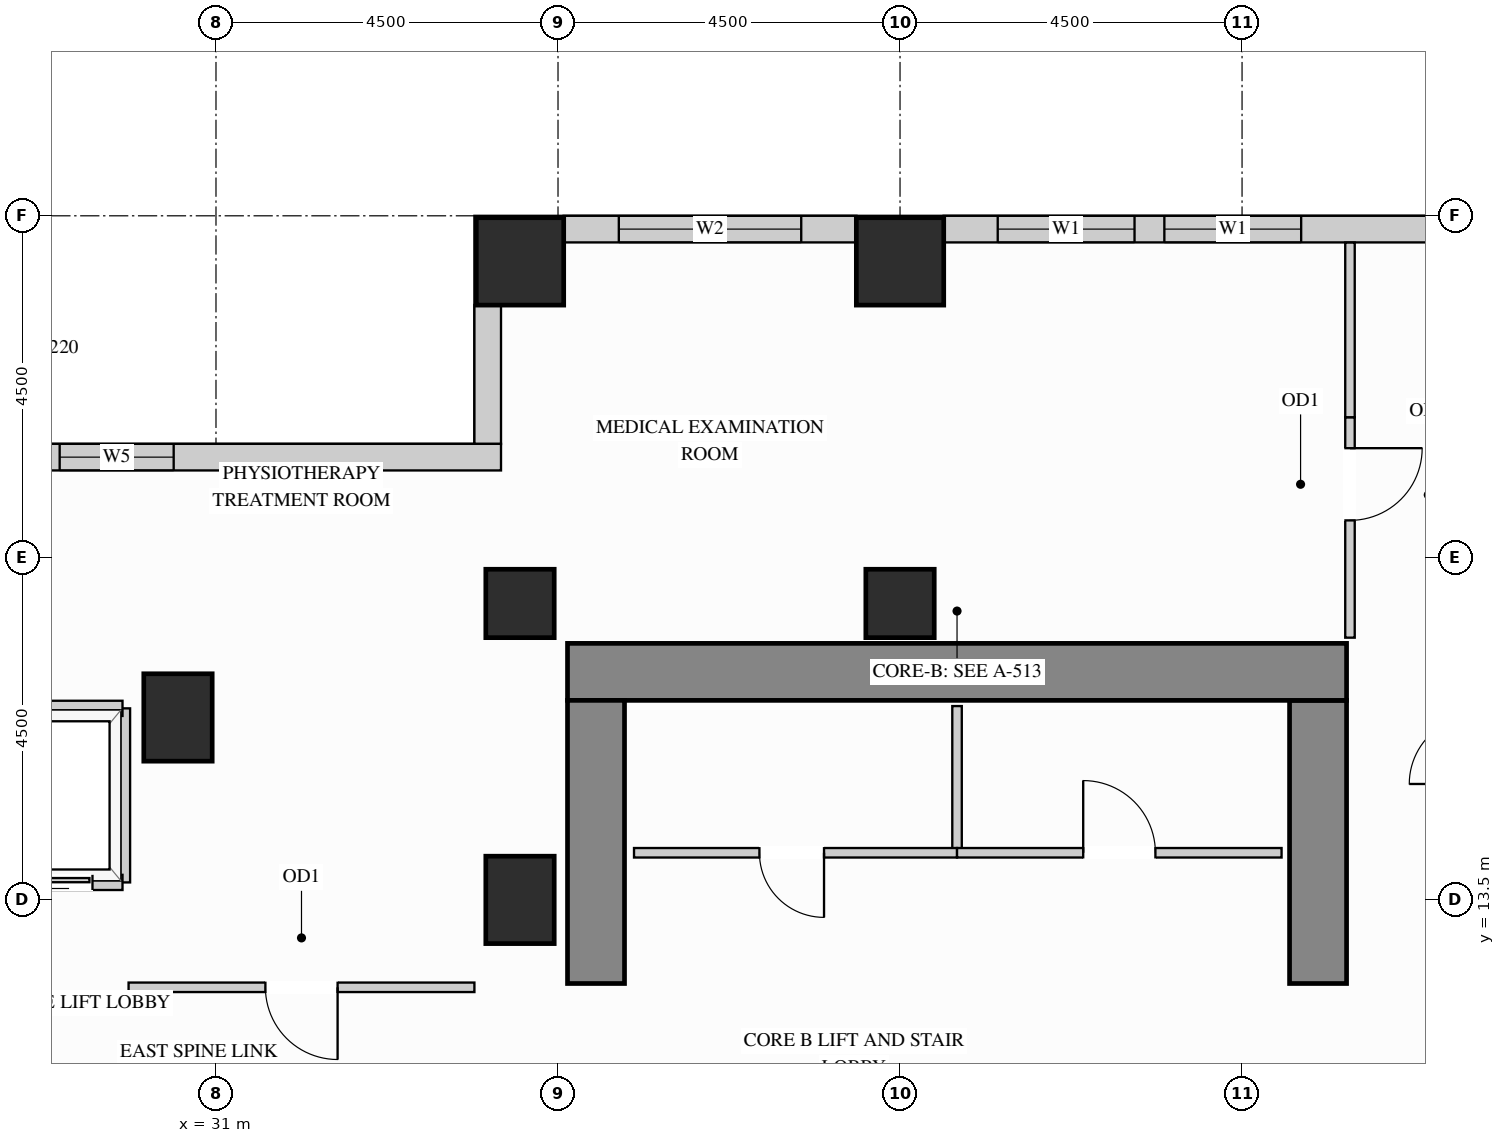
"""IFC4 building model, lengths in metres.
Left out: names, types, materials, properties, quantities, classifications, styles, units other than length and angle.
Written with IfcOpenShell. Run it as: python <this file> out.ifc"""

import sys

from ifc_helpers import new_model, si_unit, direction, frame, frame_2d, origin, origin_2d, place, context, subcontext, project, spatial, rectangle, extrude, source, transform, mapped, element, fill, save


model = new_model("IFC4")
c1 = context("Model", 3, precision=1e-05, world=origin(), true_north=direction((0.0, 1.0)))
c2 = subcontext(c1, "Body", "Model", "MODEL_VIEW")
j1 = project(units=[si_unit("LENGTHUNIT", "METRE"), si_unit("PLANEANGLEUNIT", "RADIAN")], contexts=[c1])
p1 = place(None, origin())
s1 = spatial("IfcSite", under=j1, at=p1, CompositionType="ELEMENT")
p2 = place(p1, origin())
s2 = spatial("IfcBuilding", under=s1, at=p2, CompositionType="ELEMENT")
p3 = place(p2, frame((0.0, 0.0, 117.0)))
s3 = spatial("IfcBuildingStorey", under=s2, at=p3, CompositionType="ELEMENT", Elevation=117.0)
m1 = source(origin(), c2, "Body", "SweptSolid", [
    extrude(rectangle(XDim=0.9, YDim=0.9, at=origin_2d()), origin(), (0.0, 0.0, 1.0), 3.38),
])
for number, where, z_axis, x_axis in (
    (1, (35.0, 17.4, 0.0), (0.0, 0.0, 1.0), (1.0, 0.0, 0.0)),
    (2, (40.0, 17.4, 0.0), (0.0, 0.0, 1.0), (1.0, 0.0, 0.0)),
):
    element("IfcColumn", number, at=place(p3, frame(where, z_axis=z_axis, x_axis=x_axis)), inside=s3, PredefinedType="COLUMN", context=c2, shape_type="MappedRepresentation", body=[
        mapped(m1, transform((0.0, 0.0, 0.0), x_axis=(1.0, 0.0, 0.0), y_axis=(0.0, 1.0, 0.0), z_axis=(0.0, 0.0, 1.0))),
    ])
m2 = source(origin(), c2, "Body", "SweptSolid", [
    extrude(rectangle(XDim=0.9, YDim=1.15, at=origin_2d()), origin(), (0.0, 0.0, 1.0), 3.38),
])
for number, where, z_axis, x_axis in (
    (3, (35.0, 13.5, 0.0), (0.0, 0.0, 1.0), (1.0, 0.0, 0.0)),
    (4, (30.5, 15.9, 0.0), (0.0, 0.0, 1.0), (1.0, 0.0, 0.0)),
):
    element("IfcColumn", number, at=place(p3, frame(where, z_axis=z_axis, x_axis=x_axis)), inside=s3, PredefinedType="COLUMN", context=c2, shape_type="MappedRepresentation", body=[
        mapped(m2, transform((0.0, 0.0, 0.0), x_axis=(1.0, 0.0, 0.0), y_axis=(0.0, 1.0, 0.0), z_axis=(0.0, 0.0, 1.0))),
    ])
m3 = source(origin(), c2, "Body", "SweptSolid", [
    extrude(rectangle(XDim=1.15, YDim=1.15, at=origin_2d()), origin(), (0.0, 0.0, 1.0), 3.38),
])
for number, where, z_axis, x_axis in (
    (5, (35.0, 21.9, 0.0), (0.0, 0.0, 1.0), (1.0, 0.0, 0.0)),
    (6, (40.0, 21.9, 0.0), (0.0, 0.0, 1.0), (1.0, 0.0, 0.0)),
):
    element("IfcColumn", number, at=place(p3, frame(where, z_axis=z_axis, x_axis=x_axis)), inside=s3, PredefinedType="COLUMN", context=c2, shape_type="MappedRepresentation", body=[
        mapped(m3, transform((0.0, 0.0, 0.0), x_axis=(1.0, 0.0, 0.0), y_axis=(0.0, 1.0, 0.0), z_axis=(0.0, 0.0, 1.0))),
    ])
m4 = source(origin(), c2, "Body", "SweptSolid", [
    extrude(rectangle(XDim=3.725, YDim=0.75, at=frame_2d((1.863, 0.0))), origin(), (0.0, 0.0, 1.0), 3.38),
])
p4 = place(p3, frame((45.5, 12.4, 0.0), z_axis=(0.0, 0.0, 1.0), x_axis=(0.0, 1.0, 0.0)))
e7 = element("IfcWall", 7, at=p4, inside=s3, PredefinedType="SHEAR", context=c2, shape_type="MappedRepresentation", body=[
    mapped(m4, transform((0.0, 0.0, 0.0), x_axis=(1.0, 0.0, 0.0), y_axis=(0.0, 1.0, 0.0), z_axis=(0.0, 0.0, 1.0))),
])
m5 = source(origin(), c2, "Body", "SweptSolid", [
    extrude(rectangle(XDim=10.25, YDim=0.75, at=frame_2d((5.125, 0.0))), origin(), (0.0, 0.0, 1.0), 3.38),
])
p5 = place(p3, frame((35.625, 16.5, 0.0), z_axis=(0.0, 0.0, 1.0), x_axis=(1.0, 0.0, 0.0)))
e8 = element("IfcWall", 8, at=p5, inside=s3, PredefinedType="SHEAR", context=c2, shape_type="MappedRepresentation", body=[
    mapped(m5, transform((0.0, 0.0, 0.0), x_axis=(1.0, 0.0, 0.0), y_axis=(0.0, 1.0, 0.0), z_axis=(0.0, 0.0, 1.0))),
])
p6 = place(p3, frame((36.0, 12.4, 0.0), z_axis=(0.0, 0.0, 1.0), x_axis=(0.0, 1.0, 0.0)))
e9 = element("IfcWall", 9, at=p6, inside=s3, PredefinedType="SHEAR", context=c2, shape_type="MappedRepresentation", body=[
    mapped(m4, transform((0.0, 0.0, 0.0), x_axis=(1.0, 0.0, 0.0), y_axis=(0.0, 1.0, 0.0), z_axis=(0.0, 0.0, 1.0))),
])
p7 = place(p3, frame((47.027, 22.325, 0.0), z_axis=(0.0, 0.0, 1.0), x_axis=(-1.0, 0.0, 0.0)))
e10 = element("IfcWall", 10, at=p7, inside=s3, PredefinedType="SOLIDWALL", context=c2, shape_type="SweptSolid", body=[
    extrude(rectangle(XDim=6.454, YDim=0.35, at=frame_2d((3.227, 0.0))), origin(), (0.0, 0.0, 1.0), 3.365),
])
p8 = place(p7, frame((1.749, 0.0, 0.78)))
e11 = element("IfcOpeningElement", 11, at=p8, cuts=e10, PredefinedType="OPENING", context=c2, shape_type="SweptSolid", body=[
    extrude(rectangle(XDim=1.8, YDim=2.1, at=frame_2d((0.9, 1.05))), frame((0.0, 0.185, 0.0), z_axis=(0.0, -1.0, 0.0), x_axis=(1.0, 0.0, 0.0)), (0.0, 0.0, 1.0), 0.37),
])
p9 = place(p7, frame((3.942, 0.0, 0.78)))
e12 = element("IfcOpeningElement", 12, at=p9, cuts=e10, PredefinedType="OPENING", context=c2, shape_type="SweptSolid", body=[
    extrude(rectangle(XDim=1.8, YDim=2.1, at=frame_2d((0.9, 1.05))), frame((0.0, 0.185, 0.0), z_axis=(0.0, -1.0, 0.0), x_axis=(1.0, 0.0, 0.0)), (0.0, 0.0, 1.0), 0.37),
])
p10 = place(p3, frame((39.427, 22.325, 0.0), z_axis=(0.0, 0.0, 1.0), x_axis=(-1.0, 0.0, 0.0)))
e13 = element("IfcWall", 13, at=p10, inside=s3, PredefinedType="SOLIDWALL", context=c2, shape_type="SweptSolid", body=[
    extrude(rectangle(XDim=3.854, YDim=0.35, at=frame_2d((1.927, 0.0))), origin(), (0.0, 0.0, 1.0), 3.365),
])
p11 = place(p10, frame((0.727, 0.0, 0.78)))
e14 = element("IfcOpeningElement", 14, at=p11, cuts=e13, PredefinedType="OPENING", context=c2, shape_type="SweptSolid", body=[
    extrude(rectangle(XDim=2.4, YDim=2.1, at=frame_2d((1.2, 1.05))), frame((0.0, 0.185, 0.0), z_axis=(0.0, -1.0, 0.0), x_axis=(1.0, 0.0, 0.0)), (0.0, 0.0, 1.0), 0.37),
])
m6 = source(origin(), c2, "Body", "SweptSolid", [
    extrude(rectangle(XDim=1.829, YDim=0.35, at=frame_2d((0.915, 0.0))), origin(), (0.0, 0.0, 1.0), 3.365),
])
p12 = place(p3, frame((34.575, 21.327, 0.0), z_axis=(0.0, 0.0, 1.0), x_axis=(0.0, -1.0, 0.0)))
e15 = element("IfcWall", 15, at=p12, inside=s3, PredefinedType="SOLIDWALL", context=c2, shape_type="MappedRepresentation", body=[
    mapped(m6, transform((0.0, 0.0, 0.0), x_axis=(1.0, 0.0, 0.0), y_axis=(0.0, 1.0, 0.0), z_axis=(0.0, 0.0, 1.0))),
])
p13 = place(p3, frame((34.75, 19.325, 0.0), z_axis=(0.0, 0.0, 1.0), x_axis=(-1.0, 0.0, 0.0)))
e16 = element("IfcWall", 16, at=p13, inside=s3, PredefinedType="SOLIDWALL", context=c2, shape_type="SweptSolid", body=[
    extrude(rectangle(XDim=15.6, YDim=0.35, at=frame_2d((7.8, 0.0))), origin(), (0.0, 0.0, 1.0), 3.365),
])
p14 = place(p13, frame((4.307, 0.0, 0.78)))
e17 = element("IfcOpeningElement", 17, at=p14, cuts=e16, PredefinedType="OPENING", context=c2, shape_type="SweptSolid", body=[
    extrude(rectangle(XDim=1.5, YDim=2.0, at=frame_2d((0.75, 1.0))), frame((0.0, 0.185, 0.0), z_axis=(0.0, -1.0, 0.0), x_axis=(1.0, 0.0, 0.0)), (0.0, 0.0, 1.0), 0.37),
])
p15 = place(p13, frame((9.793, 0.0, 0.78)))
e18 = element("IfcOpeningElement", 18, at=p15, cuts=e16, PredefinedType="OPENING", context=c2, shape_type="SweptSolid", body=[
    extrude(rectangle(XDim=1.5, YDim=2.0, at=frame_2d((0.75, 1.0))), frame((0.0, 0.185, 0.0), z_axis=(0.0, -1.0, 0.0), x_axis=(1.0, 0.0, 0.0)), (0.0, 0.0, 1.0), 0.37),
])
m7 = source(origin(), c2, "Body", "SweptSolid", [
    extrude(rectangle(XDim=1.93, YDim=0.125, at=frame_2d((0.965, 0.0))), origin(), (0.0, 0.0, 1.0), 3.365),
])
p16 = place(p3, frame((40.75, 14.12, 0.0), z_axis=(0.0, 0.0, 1.0), x_axis=(0.0, 1.0, 0.0)))
e19 = element("IfcWall", 19, at=p16, inside=s3, PredefinedType="PARTITIONING", context=c2, shape_type="MappedRepresentation", body=[
    mapped(m7, transform((0.0, 0.0, 0.0), x_axis=(1.0, 0.0, 0.0), y_axis=(0.0, 1.0, 0.0), z_axis=(0.0, 0.0, 1.0))),
])
p17 = place(p3, frame((36.5, 14.12, 0.0), z_axis=(0.0, 0.0, 1.0), x_axis=(1.0, 0.0, 0.0)))
e20 = element("IfcWall", 20, at=p17, inside=s3, PredefinedType="PARTITIONING", context=c2, shape_type="SweptSolid", body=[
    extrude(rectangle(XDim=4.25, YDim=0.125, at=frame_2d((2.125, 0.0))), origin(), (0.0, 0.0, 1.0), 3.365),
])
p18 = place(p17, frame((1.65, 0.0, 0.0)))
e21 = element("IfcOpeningElement", 21, at=p18, cuts=e20, PredefinedType="OPENING", context=c2, shape_type="SweptSolid", body=[
    extrude(rectangle(XDim=0.85, YDim=2.1, at=frame_2d((0.425, 1.05))), frame((0.0, 0.073, 0.0), z_axis=(0.0, -1.0, 0.0), x_axis=(1.0, 0.0, 0.0)), (0.0, 0.0, 1.0), 0.145),
])
p19 = place(p3, frame((40.75, 14.12, 0.0), z_axis=(0.0, 0.0, 1.0), x_axis=(1.0, 0.0, 0.0)))
e22 = element("IfcWall", 22, at=p19, inside=s3, PredefinedType="PARTITIONING", context=c2, shape_type="SweptSolid", body=[
    extrude(rectangle(XDim=4.27, YDim=0.125, at=frame_2d((2.135, 0.0))), origin(), (0.0, 0.0, 1.0), 3.365),
])
p20 = place(p19, frame((1.66, 0.0, 0.0)))
e23 = element("IfcOpeningElement", 23, at=p20, cuts=e22, PredefinedType="OPENING", context=c2, shape_type="SweptSolid", body=[
    extrude(rectangle(XDim=0.95, YDim=2.15, at=frame_2d((0.475, 1.075))), frame((0.0, 0.073, 0.0), z_axis=(0.0, -1.0, 0.0), x_axis=(1.0, 0.0, 0.0)), (0.0, 0.0, 1.0), 0.145),
])
p21 = place(p3, frame((45.92, 16.95, 0.0), z_axis=(0.0, 0.0, 1.0), x_axis=(0.0, 1.0, 0.0)))
e24 = element("IfcWall", 24, at=p21, inside=s3, PredefinedType="PARTITIONING", context=c2, shape_type="SweptSolid", body=[
    extrude(rectangle(XDim=2.9, YDim=0.125, at=frame_2d((1.45, 0.0))), origin(), (0.0, 0.0, 1.0), 3.365),
])
p22 = place(p21, frame((1.543, 0.0, 0.0)))
e25 = element("IfcOpeningElement", 25, at=p22, cuts=e24, PredefinedType="OPENING", context=c2, shape_type="SweptSolid", body=[
    extrude(rectangle(XDim=0.95, YDim=2.15, at=frame_2d((0.475, 1.075))), frame((0.0, 0.073, 0.0), z_axis=(0.0, -1.0, 0.0), x_axis=(1.0, 0.0, 0.0)), (0.0, 0.0, 1.0), 0.145),
])
m8 = source(origin(), c2, "Body", "SweptSolid", [
    extrude(rectangle(XDim=2.298, YDim=0.125, at=frame_2d((1.149, 0.0))), origin(), (0.0, 0.0, 1.0), 3.365),
])
p23 = place(p3, frame((45.92, 19.85, 0.0), z_axis=(0.0, 0.0, 1.0), x_axis=(0.0, 1.0, 0.0)))
e26 = element("IfcWall", 26, at=p23, inside=s3, PredefinedType="PARTITIONING", context=c2, shape_type="MappedRepresentation", body=[
    mapped(m8, transform((0.0, 0.0, 0.0), x_axis=(1.0, 0.0, 0.0), y_axis=(0.0, 1.0, 0.0), z_axis=(0.0, 0.0, 1.0))),
])
p24 = place(p3, frame((29.85, 12.35, 0.0), z_axis=(0.0, 0.0, 1.0), x_axis=(1.0, 0.0, 0.0)))
e27 = element("IfcWall", 27, at=p24, inside=s3, PredefinedType="PARTITIONING", context=c2, shape_type="SweptSolid", body=[
    extrude(rectangle(XDim=4.55, YDim=0.125, at=frame_2d((2.275, 0.0))), origin(), (0.0, 0.0, 1.0), 3.365),
])
p25 = place(p24, frame((1.8, 0.0, 0.0)))
e28 = element("IfcOpeningElement", 28, at=p25, cuts=e27, PredefinedType="OPENING", context=c2, shape_type="SweptSolid", body=[
    extrude(rectangle(XDim=0.95, YDim=2.15, at=frame_2d((0.475, 1.075))), frame((0.0, 0.073, 0.0), z_axis=(0.0, -1.0, 0.0), x_axis=(1.0, 0.0, 0.0)), (0.0, 0.0, 1.0), 0.145),
])
m9 = source(origin(), c2, "Body", "SweptSolid", [
    extrude(rectangle(XDim=2.29, YDim=0.2, at=frame_2d((1.145, 0.0))), origin(), (0.0, 0.0, 1.0), 3.365),
])
p26 = place(p3, frame((29.77, 13.73, 0.0), z_axis=(0.0, 0.0, 1.0), x_axis=(0.0, 1.0, 0.0)))
e29 = element("IfcWall", 29, at=p26, inside=s3, PredefinedType="PARTITIONING", context=c2, shape_type="MappedRepresentation", body=[
    mapped(m9, transform((0.0, 0.0, 0.0), x_axis=(1.0, 0.0, 0.0), y_axis=(0.0, 1.0, 0.0), z_axis=(0.0, 0.0, 1.0))),
])
m10 = source(origin(), c2, "Body", "SweptSolid", [
    extrude(rectangle(XDim=1.89, YDim=0.2, at=frame_2d((0.945, 0.0))), origin(), (0.0, 0.0, 1.0), 2.677),
])
p27 = place(p3, frame((27.88, 16.02, 0.0), z_axis=(0.0, 0.0, 1.0), x_axis=(1.0, 0.0, 0.0)))
e30 = element("IfcWall", 30, at=p27, inside=s3, PredefinedType="PARTITIONING", context=c2, shape_type="MappedRepresentation", body=[
    mapped(m10, transform((0.0, 0.0, 0.0), x_axis=(1.0, 0.0, 0.0), y_axis=(0.0, 1.0, 0.0), z_axis=(0.0, 0.0, 1.0))),
])
p28 = place(p3, frame((27.88, 13.73, 0.0), z_axis=(0.0, 0.0, 1.0), x_axis=(1.0, 0.0, 0.0)))
e31 = element("IfcWall", 31, at=p28, inside=s3, PredefinedType="PARTITIONING", context=c2, shape_type="SweptSolid", body=[
    extrude(rectangle(XDim=1.89, YDim=0.2, at=frame_2d((0.945, 0.0))), origin(), (0.0, 0.0, 1.0), 2.446),
])
p29 = place(p28, frame((0.395, 0.0, 0.0)))
e32 = element("IfcOpeningElement", 32, at=p29, cuts=e31, PredefinedType="OPENING", context=c2, shape_type="SweptSolid", body=[
    extrude(rectangle(XDim=1.1, YDim=2.2, at=frame_2d((0.55, 1.1))), frame((0.0, 0.11, 0.0), z_axis=(0.0, -1.0, 0.0), x_axis=(1.0, 0.0, 0.0)), (0.0, 0.0, 1.0), 0.22),
])
m11 = source(origin(), c2, "Body", "SweptSolid", [
    extrude(rectangle(XDim=1.1, YDim=2.2, at=frame_2d((0.55, 1.1))), frame((0.0, 0.025, 0.0), z_axis=(0.0, -1.0, 0.0), x_axis=(1.0, 0.0, 0.0)), (0.0, 0.0, 1.0), 0.05),
])
p30 = place(p29, origin())
e33 = element("IfcDoor", 33, at=p30, inside=s3, OperationType="SLIDING_TO_LEFT", PredefinedType="DOOR", context=c2, shape_type="MappedRepresentation", body=[
    mapped(m11, transform((0.0, 0.0, 0.0), x_axis=(1.0, 0.0, 0.0), y_axis=(0.0, 1.0, 0.0), z_axis=(0.0, 0.0, 1.0))),
])
fill(e32, e33)
m12 = source(origin(), c2, "Body", "SweptSolid", [
    extrude(rectangle(XDim=0.95, YDim=2.15, at=frame_2d((0.475, 1.075))), frame((0.0, 0.025, 0.0), z_axis=(0.0, -1.0, 0.0), x_axis=(1.0, 0.0, 0.0)), (0.0, 0.0, 1.0), 0.05),
])
p31 = place(p20, origin())
e34 = element("IfcDoor", 34, at=p31, inside=s3, OperationType="SINGLE_SWING_LEFT", PredefinedType="DOOR", context=c2, shape_type="MappedRepresentation", body=[
    mapped(m12, transform((0.0, 0.0, 0.0), x_axis=(1.0, 0.0, 0.0), y_axis=(0.0, 1.0, 0.0), z_axis=(0.0, 0.0, 1.0))),
])
fill(e23, e34)
p32 = place(p22, origin())
e35 = element("IfcDoor", 35, at=p32, inside=s3, OperationType="SINGLE_SWING_RIGHT", PredefinedType="DOOR", context=c2, shape_type="MappedRepresentation", body=[
    mapped(m12, transform((0.0, 0.0, 0.0), x_axis=(1.0, 0.0, 0.0), y_axis=(0.0, 1.0, 0.0), z_axis=(0.0, 0.0, 1.0))),
])
fill(e25, e35)
p33 = place(p25, origin())
e36 = element("IfcDoor", 36, at=p33, inside=s3, OperationType="SINGLE_SWING_RIGHT", PredefinedType="DOOR", context=c2, shape_type="MappedRepresentation", body=[
    mapped(m12, transform((0.0, 0.0, 0.0), x_axis=(1.0, 0.0, 0.0), y_axis=(0.0, 1.0, 0.0), z_axis=(0.0, 0.0, 1.0))),
])
fill(e28, e36)
m13 = source(origin(), c2, "Body", "SweptSolid", [
    extrude(rectangle(XDim=0.85, YDim=2.1, at=frame_2d((0.425, 1.05))), frame((0.0, 0.025, 0.0), z_axis=(0.0, -1.0, 0.0), x_axis=(1.0, 0.0, 0.0)), (0.0, 0.0, 1.0), 0.05),
])
p34 = place(p18, origin())
e37 = element("IfcDoor", 37, at=p34, inside=s3, OperationType="SINGLE_SWING_RIGHT", PredefinedType="DOOR", context=c2, shape_type="MappedRepresentation", body=[
    mapped(m13, transform((0.0, 0.0, 0.0), x_axis=(1.0, 0.0, 0.0), y_axis=(0.0, 1.0, 0.0), z_axis=(0.0, 0.0, 1.0))),
])
fill(e21, e37)
m14 = source(origin(), c2, "Body", "SweptSolid", [
    extrude(rectangle(XDim=1.8, YDim=2.1, at=frame_2d((0.9, 1.05))), frame((0.0, 0.03, 0.0), z_axis=(0.0, -1.0, 0.0), x_axis=(1.0, 0.0, 0.0)), (0.0, 0.0, 1.0), 0.06),
])
p35 = place(p8, origin())
e38 = element("IfcWindow", 38, at=p35, inside=s3, PartitioningType="SINGLE_PANEL", PredefinedType="WINDOW", context=c2, shape_type="MappedRepresentation", body=[
    mapped(m14, transform((0.0, 0.0, 0.0), x_axis=(1.0, 0.0, 0.0), y_axis=(0.0, 1.0, 0.0), z_axis=(0.0, 0.0, 1.0))),
])
fill(e11, e38)
p36 = place(p9, origin())
e39 = element("IfcWindow", 39, at=p36, inside=s3, PartitioningType="SINGLE_PANEL", PredefinedType="WINDOW", context=c2, shape_type="MappedRepresentation", body=[
    mapped(m14, transform((0.0, 0.0, 0.0), x_axis=(1.0, 0.0, 0.0), y_axis=(0.0, 1.0, 0.0), z_axis=(0.0, 0.0, 1.0))),
])
fill(e12, e39)
m15 = source(origin(), c2, "Body", "SweptSolid", [
    extrude(rectangle(XDim=2.4, YDim=2.1, at=frame_2d((1.2, 1.05))), frame((0.0, 0.03, 0.0), z_axis=(0.0, -1.0, 0.0), x_axis=(1.0, 0.0, 0.0)), (0.0, 0.0, 1.0), 0.06),
])
p37 = place(p11, origin())
e40 = element("IfcWindow", 40, at=p37, inside=s3, PartitioningType="SINGLE_PANEL", PredefinedType="WINDOW", context=c2, shape_type="MappedRepresentation", body=[
    mapped(m15, transform((0.0, 0.0, 0.0), x_axis=(1.0, 0.0, 0.0), y_axis=(0.0, 1.0, 0.0), z_axis=(0.0, 0.0, 1.0))),
])
fill(e14, e40)
m16 = source(origin(), c2, "Body", "SweptSolid", [
    extrude(rectangle(XDim=1.5, YDim=2.0, at=frame_2d((0.75, 1.0))), frame((0.0, 0.03, 0.0), z_axis=(0.0, -1.0, 0.0), x_axis=(1.0, 0.0, 0.0)), (0.0, 0.0, 1.0), 0.06),
])
p38 = place(p14, origin())
e41 = element("IfcWindow", 41, at=p38, inside=s3, PartitioningType="SINGLE_PANEL", PredefinedType="WINDOW", context=c2, shape_type="MappedRepresentation", body=[
    mapped(m16, transform((0.0, 0.0, 0.0), x_axis=(1.0, 0.0, 0.0), y_axis=(0.0, 1.0, 0.0), z_axis=(0.0, 0.0, 1.0))),
])
fill(e17, e41)
save(model, sys.argv[1])
